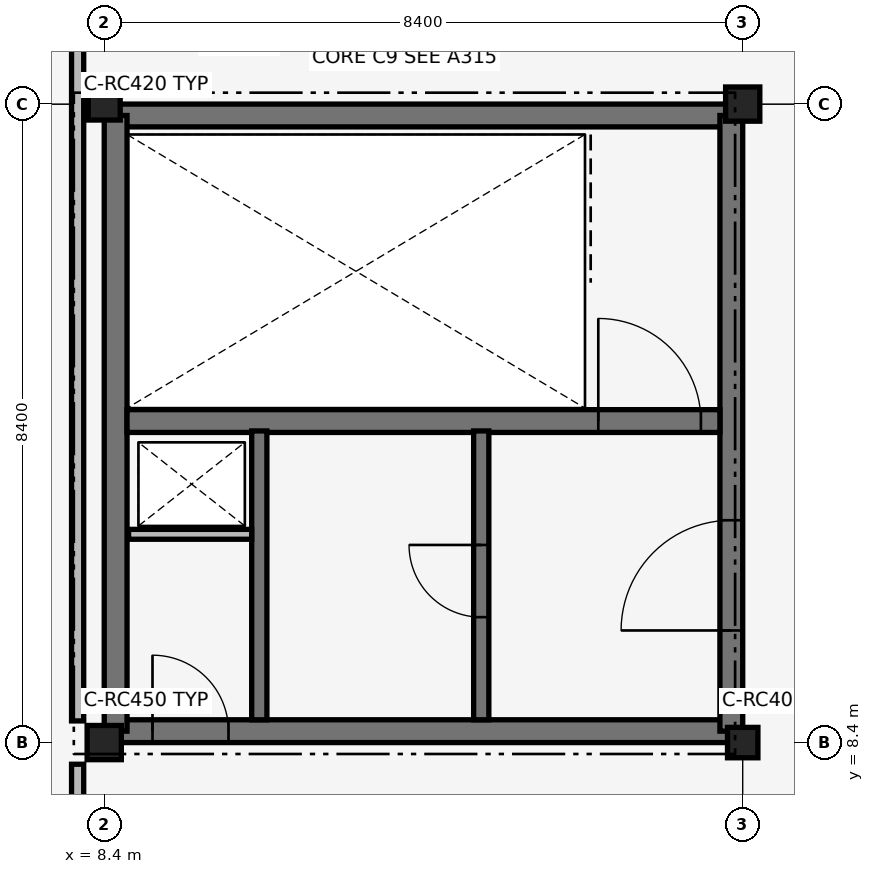
"""IFC4 building model, lengths in metres.
Left out: names, types, materials, properties, quantities, classifications, styles, units other than length and angle.
Written with IfcOpenShell. Run it as: python <this file> out.ifc"""

import sys

from ifc_helpers import new_model, si_unit, direction, frame, frame_2d, origin, origin_2d, place, context, subcontext, project, spatial, rectangle, extrude, element, fill, save


model = new_model("IFC4")
c1 = context("Model", 3, precision=1e-05, world=origin(), true_north=direction((0.0, 1.0)))
c2 = subcontext(c1, "Body", "Model", "MODEL_VIEW")
j1 = project(units=[si_unit("LENGTHUNIT", "METRE"), si_unit("PLANEANGLEUNIT", "RADIAN")], contexts=[c1])
p1 = place(None, origin())
s1 = spatial("IfcSite", under=j1, at=p1, CompositionType="ELEMENT")
p2 = place(p1, origin())
s2 = spatial("IfcBuilding", under=s1, at=p2, CompositionType="ELEMENT")
p3 = place(p2, frame((0.0, 0.0, 5.44)))
s3 = spatial("IfcBuildingStorey", under=s2, at=p3, CompositionType="ELEMENT", Elevation=5.44)
p4 = place(p3, frame((8.55, 8.55, 0.0), z_axis=(0.0, 0.0, 1.0), x_axis=(1.0, 0.0, 0.0)))
e1 = element("IfcWall", 1, at=p4, inside=s3, PredefinedType="SHEAR", context=c2, shape_type="SweptSolid", body=[
    extrude(rectangle(XDim=8.1, YDim=0.3, at=frame_2d((4.05, 0.0))), origin(), (0.0, 0.0, 1.0), 4.12),
])
p5 = place(p4, frame((0.485, 0.0, 0.0)))
e2 = element("IfcOpeningElement", 2, at=p5, cuts=e1, PredefinedType="OPENING", context=c2, shape_type="SweptSolid", body=[
    extrude(rectangle(XDim=1.0, YDim=2.15, at=frame_2d((0.5, 1.075))), frame((0.0, 0.16, 0.0), z_axis=(0.0, -1.0, 0.0), x_axis=(1.0, 0.0, 0.0)), (0.0, 0.0, 1.0), 0.32),
])
for number, where, z_axis, x_axis in (
    (3, (8.55, 16.65, 0.0), (0.0, 0.0, 1.0), (1.0, 0.0, 0.0)),
    (4, (8.55, 8.55, 0.0), (0.0, 0.0, 1.0), (0.0, 1.0, 0.0)),
):
    element("IfcWall", number, at=place(p3, frame(where, z_axis=z_axis, x_axis=x_axis)), inside=s3, PredefinedType="SHEAR", context=c2, shape_type="SweptSolid", body=[
        extrude(rectangle(XDim=8.1, YDim=0.3, at=frame_2d((4.05, 0.0))), origin(), (0.0, 0.0, 1.0), 4.12),
    ])
p6 = place(p3, frame((16.65, 8.55, 0.0), z_axis=(0.0, 0.0, 1.0), x_axis=(0.0, 1.0, 0.0)))
e5 = element("IfcWall", 5, at=p6, inside=s3, PredefinedType="SHEAR", context=c2, shape_type="SweptSolid", body=[
    extrude(rectangle(XDim=8.1, YDim=0.3, at=frame_2d((4.05, 0.0))), origin(), (0.0, 0.0, 1.0), 4.12),
])
p7 = place(p6, frame((1.325, 0.0, 0.0)))
e6 = element("IfcOpeningElement", 6, at=p7, cuts=e5, PredefinedType="OPENING", context=c2, shape_type="SweptSolid", body=[
    extrude(rectangle(XDim=1.45, YDim=2.15, at=frame_2d((0.725, 1.075))), frame((0.0, 0.16, 0.0), z_axis=(0.0, -1.0, 0.0), x_axis=(1.0, 0.0, 0.0)), (0.0, 0.0, 1.0), 0.32),
])
p8 = place(p3, frame((8.7, 12.63, 0.0), z_axis=(0.0, 0.0, 1.0), x_axis=(1.0, 0.0, 0.0)))
e7 = element("IfcWall", 7, at=p8, inside=s3, PredefinedType="SHEAR", context=c2, shape_type="SweptSolid", body=[
    extrude(rectangle(XDim=7.8, YDim=0.3, at=frame_2d((3.9, 0.0))), origin(), (0.0, 0.0, 1.0), 4.12),
])
p9 = place(p8, frame((6.2, 0.0, 0.0)))
e8 = element("IfcOpeningElement", 8, at=p9, cuts=e7, PredefinedType="OPENING", context=c2, shape_type="SweptSolid", body=[
    extrude(rectangle(XDim=1.35, YDim=2.15, at=frame_2d((0.675, 1.075))), frame((0.0, 0.16, 0.0), z_axis=(0.0, -1.0, 0.0), x_axis=(1.0, 0.0, 0.0)), (0.0, 0.0, 1.0), 0.32),
])
p10 = place(p3, frame((8.4, 8.4, 0.0), z_axis=(0.0, 0.0, 1.0), x_axis=(1.0, 0.0, 0.0)))
e9 = element("IfcColumn", 9, at=p10, inside=s3, PredefinedType="COLUMN", context=c2, shape_type="SweptSolid", body=[
    extrude(rectangle(XDim=0.45, YDim=0.45, at=origin_2d()), origin(), (0.0, 0.0, 1.0), 4.12),
])
p11 = place(p3, frame((8.4, 16.8, 0.0), z_axis=(0.0, 0.0, 1.0), x_axis=(1.0, 0.0, 0.0)))
e10 = element("IfcColumn", 10, at=p11, inside=s3, PredefinedType="COLUMN", context=c2, shape_type="SweptSolid", body=[
    extrude(rectangle(XDim=0.42, YDim=0.42, at=origin_2d()), origin(), (0.0, 0.0, 1.0), 4.12),
])
p12 = place(p3, frame((16.8, 8.4, 0.0), z_axis=(0.0, 0.0, 1.0), x_axis=(1.0, 0.0, 0.0)))
e11 = element("IfcColumn", 11, at=p12, inside=s3, PredefinedType="COLUMN", context=c2, shape_type="SweptSolid", body=[
    extrude(rectangle(XDim=0.4, YDim=0.4, at=origin_2d()), origin(), (0.0, 0.0, 1.0), 4.12),
])
p13 = place(p3, frame((16.8, 16.8, 0.0), z_axis=(0.0, 0.0, 1.0), x_axis=(1.0, 0.0, 0.0)))
e12 = element("IfcColumn", 12, at=p13, inside=s3, PredefinedType="COLUMN", context=c2, shape_type="SweptSolid", body=[
    extrude(rectangle(XDim=0.45, YDim=0.45, at=origin_2d()), origin(), (0.0, 0.0, 1.0), 4.12),
])
p14 = place(p3, frame((13.36, 8.7, 0.0), z_axis=(0.0, 0.0, 1.0), x_axis=(0.0, 1.0, 0.0)))
e13 = element("IfcWall", 13, at=p14, inside=s3, PredefinedType="SHEAR", context=c2, shape_type="SweptSolid", body=[
    extrude(rectangle(XDim=3.8, YDim=0.2, at=frame_2d((1.9, 0.0))), origin(), (0.0, 0.0, 1.0), 4.12),
])
p15 = place(p14, frame((1.35, 0.0, 0.0)))
e14 = element("IfcOpeningElement", 14, at=p15, cuts=e13, PredefinedType="OPENING", context=c2, shape_type="SweptSolid", body=[
    extrude(rectangle(XDim=0.95, YDim=2.1, at=frame_2d((0.475, 1.05))), frame((0.0, 0.11, 0.0), z_axis=(0.0, -1.0, 0.0), x_axis=(1.0, 0.0, 0.0)), (0.0, 0.0, 1.0), 0.22),
])
p16 = place(p3, frame((10.44, 8.7, 0.0), z_axis=(0.0, 0.0, 1.0), x_axis=(0.0, 1.0, 0.0)))
e15 = element("IfcWall", 15, at=p16, inside=s3, PredefinedType="SHEAR", context=c2, shape_type="SweptSolid", body=[
    extrude(rectangle(XDim=3.8, YDim=0.2, at=frame_2d((1.9, 0.0))), origin(), (0.0, 0.0, 1.0), 4.12),
])
p17 = place(p3, frame((8.72, 11.14, 0.0), z_axis=(0.0, 0.0, 1.0), x_axis=(1.0, 0.0, 0.0)))
e16 = element("IfcWall", 16, at=p17, inside=s3, PredefinedType="PARTITIONING", context=c2, shape_type="SweptSolid", body=[
    extrude(rectangle(XDim=1.62, YDim=0.13, at=frame_2d((0.81, 0.0))), origin(), (0.0, 0.0, 1.0), 4.12),
])
p18 = place(p3, frame((8.05, 0.18, 0.0), z_axis=(0.0, 0.0, 1.0), x_axis=(0.0, 1.0, 0.0)))
e17 = element("IfcWall", 17, at=p18, inside=s3, PredefinedType="PARTITIONING", context=c2, shape_type="SweptSolid", body=[
    extrude(rectangle(XDim=7.935, YDim=0.16, at=frame_2d((3.968, 0.0))), origin(), (0.0, 0.0, 1.0), 4.12),
])
p19 = place(p3, frame((8.05, 8.685, 0.0), z_axis=(0.0, 0.0, 1.0), x_axis=(0.0, 1.0, 0.0)))
e18 = element("IfcWall", 18, at=p19, inside=s3, PredefinedType="PARTITIONING", context=c2, shape_type="SweptSolid", body=[
    extrude(rectangle(XDim=12.765, YDim=0.16, at=frame_2d((6.382, 0.0))), origin(), (0.0, 0.0, 1.0), 4.12),
])
p20 = place(p9, origin())
e19 = element("IfcDoor", 19, at=p20, inside=s3, OperationType="SINGLE_SWING_LEFT", PredefinedType="DOOR", context=c2, shape_type="SweptSolid", body=[
    extrude(rectangle(XDim=1.35, YDim=2.15, at=frame_2d((0.675, 1.075))), frame((0.0, 0.025, 0.0), z_axis=(0.0, -1.0, 0.0), x_axis=(1.0, 0.0, 0.0)), (0.0, 0.0, 1.0), 0.05),
])
fill(e8, e19)
p21 = place(p15, origin())
e20 = element("IfcDoor", 20, at=p21, inside=s3, OperationType="SINGLE_SWING_RIGHT", PredefinedType="DOOR", context=c2, shape_type="SweptSolid", body=[
    extrude(rectangle(XDim=0.95, YDim=2.1, at=frame_2d((0.475, 1.05))), frame((0.0, 0.025, 0.0), z_axis=(0.0, -1.0, 0.0), x_axis=(1.0, 0.0, 0.0)), (0.0, 0.0, 1.0), 0.05),
])
fill(e14, e20)
p22 = place(p7, origin())
e21 = element("IfcDoor", 21, at=p22, inside=s3, OperationType="DOUBLE_DOOR_SINGLE_SWING", PredefinedType="DOOR", context=c2, shape_type="SweptSolid", body=[
    extrude(rectangle(XDim=1.45, YDim=2.15, at=frame_2d((0.725, 1.075))), frame((0.0, 0.025, 0.0), z_axis=(0.0, -1.0, 0.0), x_axis=(1.0, 0.0, 0.0)), (0.0, 0.0, 1.0), 0.05),
])
fill(e6, e21)
p23 = place(p5, origin())
e22 = element("IfcDoor", 22, at=p23, inside=s3, OperationType="SINGLE_SWING_LEFT", PredefinedType="DOOR", context=c2, shape_type="SweptSolid", body=[
    extrude(rectangle(XDim=1.0, YDim=2.15, at=frame_2d((0.5, 1.075))), frame((0.0, 0.025, 0.0), z_axis=(0.0, -1.0, 0.0), x_axis=(1.0, 0.0, 0.0)), (0.0, 0.0, 1.0), 0.05),
])
fill(e2, e22)
save(model, sys.argv[1])
